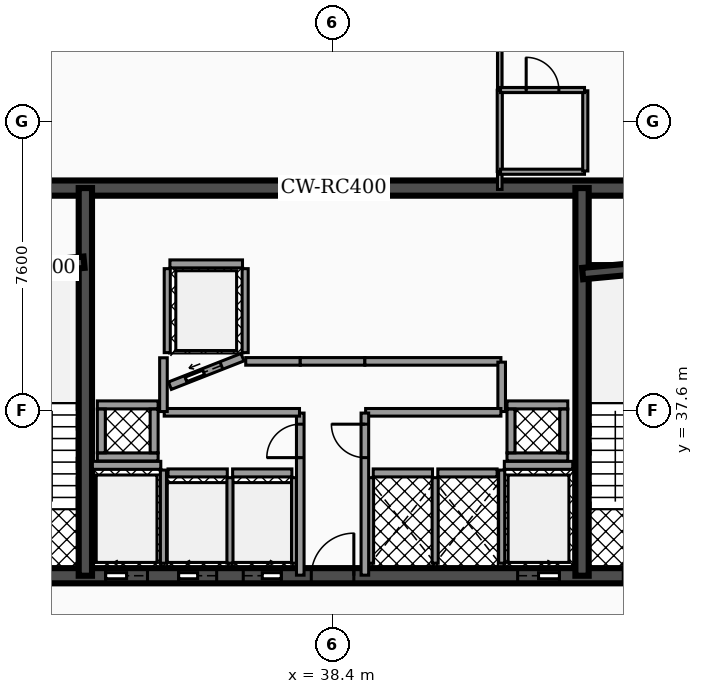
"""IFC4 building model, lengths in metres.
Left out: names, types, materials, properties, quantities, classifications, styles, units other than length and angle.
Written with IfcOpenShell. Run it as: python <this file> out.ifc"""

import sys

from ifc_helpers import new_model, si_unit, direction, frame, frame_2d, origin, place, context, subcontext, project, spatial, rectangle, extrude, element, fill, save


model = new_model("IFC4")
c1 = context("Model", 3, precision=1e-05, world=origin(), true_north=direction((0.0, 1.0)))
c2 = subcontext(c1, "Body", "Model", "MODEL_VIEW")
j1 = project(units=[si_unit("LENGTHUNIT", "METRE"), si_unit("PLANEANGLEUNIT", "RADIAN")], contexts=[c1])
p1 = place(None, origin())
s1 = spatial("IfcSite", under=j1, at=p1, CompositionType="ELEMENT")
p2 = place(p1, origin())
s2 = spatial("IfcBuilding", under=s1, at=p2, CompositionType="ELEMENT")
p3 = place(p2, frame((0.0, 0.0, 157.08)))
s3 = spatial("IfcBuildingStorey", under=s2, at=p3, CompositionType="ELEMENT", Elevation=157.08)
p4 = place(p3, frame((28.4, 43.45, 0.0), z_axis=(0.0, 0.0, 1.0), x_axis=(1.0, 0.0, 0.0)))
e1 = element("IfcWall", 1, at=p4, inside=s3, PredefinedType="SHEAR", context=c2, shape_type="SweptSolid", body=[
    extrude(rectangle(XDim=20.06, YDim=0.4, at=frame_2d((10.03, 0.0))), origin(), (0.0, 0.0, 1.0), 3.5),
])
p5 = place(p3, frame((28.4, 33.25, 0.0), z_axis=(0.0, 0.0, 1.0), x_axis=(1.0, 0.0, 0.0)))
e2 = element("IfcWall", 2, at=p5, inside=s3, PredefinedType="SHEAR", context=c2, shape_type="SweptSolid", body=[
    extrude(rectangle(XDim=20.06, YDim=0.4, at=frame_2d((10.03, 0.0))), origin(), (0.0, 0.0, 1.0), 3.5),
])
p6 = place(p5, frame((4.03, 0.0, 0.0)))
e3 = element("IfcOpeningElement", 3, at=p6, cuts=e2, PredefinedType="OPENING", context=c2, shape_type="SweptSolid", body=[
    extrude(rectangle(XDim=1.1, YDim=2.15, at=frame_2d((0.55, 1.075))), frame((0.0, 0.21, 0.0), z_axis=(0.0, -1.0, 0.0), x_axis=(1.0, 0.0, 0.0)), (0.0, 0.0, 1.0), 0.42),
])
p7 = place(p5, frame((14.87, 0.0, 0.0)))
e4 = element("IfcOpeningElement", 4, at=p7, cuts=e2, PredefinedType="OPENING", context=c2, shape_type="SweptSolid", body=[
    extrude(rectangle(XDim=1.1, YDim=2.15, at=frame_2d((0.55, 1.075))), frame((0.0, 0.21, 0.0), z_axis=(0.0, -1.0, 0.0), x_axis=(1.0, 0.0, 0.0)), (0.0, 0.0, 1.0), 0.42),
])
p8 = place(p5, frame((5.95, 0.0, 0.0)))
e5 = element("IfcOpeningElement", 5, at=p8, cuts=e2, PredefinedType="OPENING", context=c2, shape_type="SweptSolid", body=[
    extrude(rectangle(XDim=1.0, YDim=2.1, at=frame_2d((0.5, 1.05))), frame((0.0, 0.21, 0.0), z_axis=(0.0, -1.0, 0.0), x_axis=(1.0, 0.0, 0.0)), (0.0, 0.0, 1.0), 0.42),
])
p9 = place(p5, frame((7.65, 0.0, 0.0)))
e6 = element("IfcOpeningElement", 6, at=p9, cuts=e2, PredefinedType="OPENING", context=c2, shape_type="SweptSolid", body=[
    extrude(rectangle(XDim=1.0, YDim=2.1, at=frame_2d((0.5, 1.05))), frame((0.0, 0.21, 0.0), z_axis=(0.0, -1.0, 0.0), x_axis=(1.0, 0.0, 0.0)), (0.0, 0.0, 1.0), 0.42),
])
p10 = place(p5, frame((1.31, 0.0, 0.0)))
e7 = element("IfcOpeningElement", 7, at=p10, cuts=e2, PredefinedType="OPENING", context=c2, shape_type="SweptSolid", body=[
    extrude(rectangle(XDim=1.1, YDim=2.2, at=frame_2d((0.55, 1.1))), frame((0.0, 0.21, 0.0), z_axis=(0.0, -1.0, 0.0), x_axis=(1.0, 0.0, 0.0)), (0.0, 0.0, 1.0), 0.42),
])
p11 = place(p5, frame((9.44, 0.0, 0.0)))
e8 = element("IfcOpeningElement", 8, at=p11, cuts=e2, PredefinedType="OPENING", context=c2, shape_type="SweptSolid", body=[
    extrude(rectangle(XDim=1.12, YDim=2.05, at=frame_2d((0.56, 1.025))), frame((0.0, 0.21, 0.0), z_axis=(0.0, -1.0, 0.0), x_axis=(1.0, 0.0, 0.0)), (0.0, 0.0, 1.0), 0.42),
])
p12 = place(p5, frame((17.65, 0.0, 0.0)))
e9 = element("IfcOpeningElement", 9, at=p12, cuts=e2, PredefinedType="OPENING", context=c2, shape_type="SweptSolid", body=[
    extrude(rectangle(XDim=1.1, YDim=2.2, at=frame_2d((0.55, 1.1))), frame((0.0, 0.21, 0.0), z_axis=(0.0, -1.0, 0.0), x_axis=(1.0, 0.0, 0.0)), (0.0, 0.0, 1.0), 0.42),
])
for number, where, z_axis, x_axis in (
    (10, (31.895, 33.25, 0.0), (0.0, 0.0, 1.0), (0.0, 1.0, 0.0)),
    (11, (44.965, 33.25, 0.0), (0.0, 0.0, 1.0), (0.0, 1.0, 0.0)),
):
    element("IfcWall", number, at=place(p3, frame(where, z_axis=z_axis, x_axis=x_axis)), inside=s3, PredefinedType="SHEAR", context=c2, shape_type="SweptSolid", body=[
        extrude(rectangle(XDim=10.2, YDim=0.35, at=frame_2d((5.1, 0.0))), origin(), (0.0, 0.0, 1.0), 3.5),
    ])
p13 = place(p3, frame((28.64, 41.2, 0.0), z_axis=(0.0, 0.0, 1.0), x_axis=(0.995687118776, 0.092774789157, 0.0)))
e12 = element("IfcWall", 12, at=p13, inside=s3, PredefinedType="SHEAR", context=c2, shape_type="SweptSolid", body=[
    extrude(rectangle(XDim=3.234, YDim=0.3, at=frame_2d((1.617, 0.0))), origin(), (0.0, 0.0, 1.0), 3.5),
])
p14 = place(p3, frame((44.98, 41.2, 0.0), z_axis=(0.0, 0.0, 1.0), x_axis=(0.995686468965, 0.09278176286, 0.0)))
e13 = element("IfcWall", 13, at=p14, inside=s3, PredefinedType="SHEAR", context=c2, shape_type="SweptSolid", body=[
    extrude(rectangle(XDim=3.234, YDim=0.3, at=frame_2d((1.617, 0.0))), origin(), (0.0, 0.0, 1.0), 3.5),
])
p15 = place(p3, frame((32.08, 36.155, 0.0), z_axis=(0.0, 0.0, 1.0), x_axis=(1.0, 0.0, 0.0)))
e14 = element("IfcWall", 14, at=p15, inside=s3, PredefinedType="SOLIDWALL", context=c2, shape_type="SweptSolid", body=[
    extrude(rectangle(XDim=1.8, YDim=0.21, at=frame_2d((0.9, 0.0))), origin(), (0.0, 0.0, 1.0), 2.472),
])
p16 = place(p3, frame((33.95, 33.58, 0.0), z_axis=(0.0, 0.0, 1.0), x_axis=(0.0, 1.0, 0.0)))
e15 = element("IfcWall", 15, at=p16, inside=s3, PredefinedType="SOLIDWALL", context=c2, shape_type="SweptSolid", body=[
    extrude(rectangle(XDim=2.45, YDim=0.16, at=frame_2d((1.225, 0.0))), origin(), (0.0, 0.0, 1.0), 2.472),
])
p17 = place(p3, frame((42.92, 36.155, 0.0), z_axis=(0.0, 0.0, 1.0), x_axis=(1.0, 0.0, 0.0)))
e16 = element("IfcWall", 16, at=p17, inside=s3, PredefinedType="SOLIDWALL", context=c2, shape_type="SweptSolid", body=[
    extrude(rectangle(XDim=1.8, YDim=0.21, at=frame_2d((0.9, 0.0))), origin(), (0.0, 0.0, 1.0), 2.472),
])
p18 = place(p3, frame((42.85, 33.58, 0.0), z_axis=(0.0, 0.0, 1.0), x_axis=(0.0, 1.0, 0.0)))
e17 = element("IfcWall", 17, at=p18, inside=s3, PredefinedType="SOLIDWALL", context=c2, shape_type="SweptSolid", body=[
    extrude(rectangle(XDim=2.45, YDim=0.16, at=frame_2d((1.225, 0.0))), origin(), (0.0, 0.0, 1.0), 2.472),
])
p19 = place(p3, frame((34.07, 35.955, 0.0), z_axis=(0.0, 0.0, 1.0), x_axis=(1.0, 0.0, 0.0)))
e18 = element("IfcWall", 18, at=p19, inside=s3, PredefinedType="SOLIDWALL", context=c2, shape_type="SweptSolid", body=[
    extrude(rectangle(XDim=1.56, YDim=0.21, at=frame_2d((0.78, 0.0))), origin(), (0.0, 0.0, 1.0), 2.472),
])
p20 = place(p3, frame((35.7, 33.58, 0.0), z_axis=(0.0, 0.0, 1.0), x_axis=(0.0, 1.0, 0.0)))
e19 = element("IfcWall", 19, at=p20, inside=s3, PredefinedType="SOLIDWALL", context=c2, shape_type="SweptSolid", body=[
    extrude(rectangle(XDim=2.25, YDim=0.16, at=frame_2d((1.125, 0.0))), origin(), (0.0, 0.0, 1.0), 2.472),
])
p21 = place(p3, frame((35.77, 35.955, 0.0), z_axis=(0.0, 0.0, 1.0), x_axis=(1.0, 0.0, 0.0)))
e20 = element("IfcWall", 20, at=p21, inside=s3, PredefinedType="SOLIDWALL", context=c2, shape_type="SweptSolid", body=[
    extrude(rectangle(XDim=1.56, YDim=0.21, at=frame_2d((0.78, 0.0))), origin(), (0.0, 0.0, 1.0), 2.472),
])
p22 = place(p3, frame((37.4, 33.58, 0.0), z_axis=(0.0, 0.0, 1.0), x_axis=(0.0, 1.0, 0.0)))
e21 = element("IfcWall", 21, at=p22, inside=s3, PredefinedType="SOLIDWALL", context=c2, shape_type="SweptSolid", body=[
    extrude(rectangle(XDim=2.25, YDim=0.16, at=frame_2d((1.125, 0.0))), origin(), (0.0, 0.0, 1.0), 2.472),
])
p23 = place(p3, frame((34.12, 38.25, 0.0), z_axis=(0.0, 0.0, 1.0), x_axis=(0.930804993012, 0.36551616241, 0.0)))
e22 = element("IfcWall", 22, at=p23, inside=s3, PredefinedType="SOLIDWALL", context=c2, shape_type="SweptSolid", body=[
    extrude(rectangle(XDim=2.052, YDim=0.21, at=frame_2d((1.026, 0.0))), origin(), (0.0, 0.0, 1.0), 2.472),
])
p24 = place(p23, frame((0.455, 0.0, 0.0)))
e23 = element("IfcOpeningElement", 23, at=p24, cuts=e22, PredefinedType="OPENING", context=c2, shape_type="SweptSolid", body=[
    extrude(rectangle(XDim=1.0, YDim=2.1, at=frame_2d((0.5, 1.05))), frame((0.0, 0.115, 0.0), z_axis=(0.0, -1.0, 0.0), x_axis=(1.0, 0.0, 0.0)), (0.0, 0.0, 1.0), 0.23),
])
p25 = place(p3, frame((34.12, 41.455, 0.0), z_axis=(0.0, 0.0, 1.0), x_axis=(1.0, 0.0, 0.0)))
e24 = element("IfcWall", 24, at=p25, inside=s3, PredefinedType="SOLIDWALL", context=c2, shape_type="SweptSolid", body=[
    extrude(rectangle(XDim=1.91, YDim=0.21, at=frame_2d((0.955, 0.0))), origin(), (0.0, 0.0, 1.0), 2.472),
])
for number, where, z_axis, x_axis in (
    (25, (34.05, 39.12, 0.0), (0.0, 0.0, 1.0), (0.0, 1.0, 0.0)),
    (26, (36.1, 39.12, 0.0), (0.0, 0.0, 1.0), (0.0, 1.0, 0.0)),
):
    element("IfcWall", number, at=place(p3, frame(where, z_axis=z_axis, x_axis=x_axis)), inside=s3, PredefinedType="SOLIDWALL", context=c2, shape_type="SweptSolid", body=[
        extrude(rectangle(XDim=2.21, YDim=0.16, at=frame_2d((1.105, 0.0))), origin(), (0.0, 0.0, 1.0), 2.472),
    ])
p26 = place(p3, frame((39.47, 35.955, 0.0), z_axis=(0.0, 0.0, 1.0), x_axis=(1.0, 0.0, 0.0)))
e27 = element("IfcWall", 27, at=p26, inside=s3, PredefinedType="SOLIDWALL", context=c2, shape_type="SweptSolid", body=[
    extrude(rectangle(XDim=1.56, YDim=0.21, at=frame_2d((0.78, 0.0))), origin(), (0.0, 0.0, 1.0), 2.472),
])
for number, where, z_axis, x_axis in (
    (28, (39.4, 33.58, 0.0), (0.0, 0.0, 1.0), (0.0, 1.0, 0.0)),
    (29, (41.1, 33.58, 0.0), (0.0, 0.0, 1.0), (0.0, 1.0, 0.0)),
):
    element("IfcWall", number, at=place(p3, frame(where, z_axis=z_axis, x_axis=x_axis)), inside=s3, PredefinedType="SOLIDWALL", context=c2, shape_type="SweptSolid", body=[
        extrude(rectangle(XDim=2.25, YDim=0.16, at=frame_2d((1.125, 0.0))), origin(), (0.0, 0.0, 1.0), 2.472),
    ])
p27 = place(p3, frame((41.17, 35.955, 0.0), z_axis=(0.0, 0.0, 1.0), x_axis=(1.0, 0.0, 0.0)))
e30 = element("IfcWall", 30, at=p27, inside=s3, PredefinedType="SOLIDWALL", context=c2, shape_type="SweptSolid", body=[
    extrude(rectangle(XDim=1.56, YDim=0.21, at=frame_2d((0.78, 0.0))), origin(), (0.0, 0.0, 1.0), 2.472),
])
for number, where, z_axis, x_axis in (
    (31, (32.21, 36.375, 0.0), (0.0, 0.0, 1.0), (1.0, 0.0, 0.0)),
    (32, (32.21, 37.745, 0.0), (0.0, 0.0, 1.0), (1.0, 0.0, 0.0)),
):
    element("IfcWall", number, at=place(p3, frame(where, z_axis=z_axis, x_axis=x_axis)), inside=s3, PredefinedType="SOLIDWALL", context=c2, shape_type="SweptSolid", body=[
        extrude(rectangle(XDim=1.6, YDim=0.21, at=frame_2d((0.8, 0.0))), origin(), (0.0, 0.0, 1.0), 3.5),
    ])
for number, where, z_axis, x_axis in (
    (33, (32.315, 36.485, 0.0), (0.0, 0.0, 1.0), (0.0, 1.0, 0.0)),
    (34, (33.705, 36.485, 0.0), (0.0, 0.0, 1.0), (0.0, 1.0, 0.0)),
):
    element("IfcWall", number, at=place(p3, frame(where, z_axis=z_axis, x_axis=x_axis)), inside=s3, PredefinedType="SOLIDWALL", context=c2, shape_type="SweptSolid", body=[
        extrude(rectangle(XDim=1.15, YDim=0.21, at=frame_2d((0.575, 0.0))), origin(), (0.0, 0.0, 1.0), 3.5),
    ])
for number, where, z_axis, x_axis in (
    (35, (42.99, 36.375, 0.0), (0.0, 0.0, 1.0), (1.0, 0.0, 0.0)),
    (36, (42.99, 37.745, 0.0), (0.0, 0.0, 1.0), (1.0, 0.0, 0.0)),
):
    element("IfcWall", number, at=place(p3, frame(where, z_axis=z_axis, x_axis=x_axis)), inside=s3, PredefinedType="SOLIDWALL", context=c2, shape_type="SweptSolid", body=[
        extrude(rectangle(XDim=1.6, YDim=0.21, at=frame_2d((0.8, 0.0))), origin(), (0.0, 0.0, 1.0), 3.5),
    ])
for number, where, z_axis, x_axis in (
    (37, (43.095, 36.485, 0.0), (0.0, 0.0, 1.0), (0.0, 1.0, 0.0)),
    (38, (44.485, 36.485, 0.0), (0.0, 0.0, 1.0), (0.0, 1.0, 0.0)),
):
    element("IfcWall", number, at=place(p3, frame(where, z_axis=z_axis, x_axis=x_axis)), inside=s3, PredefinedType="SOLIDWALL", context=c2, shape_type="SweptSolid", body=[
        extrude(rectangle(XDim=1.15, YDim=0.21, at=frame_2d((0.575, 0.0))), origin(), (0.0, 0.0, 1.0), 3.5),
    ])
p28 = place(p3, frame((37.55, 33.265, 0.0), z_axis=(0.0, 0.0, 1.0), x_axis=(0.0, 1.0, 0.0)))
e39 = element("IfcWall", 39, at=p28, inside=s3, PredefinedType="PARTITIONING", context=c2, shape_type="SweptSolid", body=[
    extrude(rectangle(XDim=4.265, YDim=0.2, at=frame_2d((2.133, 0.0))), origin(), (0.0, 0.0, 1.0), 2.457),
])
p29 = place(p28, frame((3.093, 0.0, 0.0)))
e40 = element("IfcOpeningElement", 40, at=p29, cuts=e39, PredefinedType="OPENING", context=c2, shape_type="SweptSolid", body=[
    extrude(rectangle(XDim=0.88, YDim=2.05, at=frame_2d((0.44, 1.025))), frame((0.0, 0.11, 0.0), z_axis=(0.0, -1.0, 0.0), x_axis=(1.0, 0.0, 0.0)), (0.0, 0.0, 1.0), 0.22),
])
p30 = place(p3, frame((33.97, 37.55, 0.0), z_axis=(0.0, 0.0, 1.0), x_axis=(1.0, 0.0, 0.0)))
e41 = element("IfcWall", 41, at=p30, inside=s3, PredefinedType="PARTITIONING", context=c2, shape_type="SweptSolid", body=[
    extrude(rectangle(XDim=3.56, YDim=0.2, at=frame_2d((1.78, 0.0))), origin(), (0.0, 0.0, 1.0), 2.457),
])
p31 = place(p3, frame((33.95, 37.57, 0.0), z_axis=(0.0, 0.0, 1.0), x_axis=(0.0, 1.0, 0.0)))
e42 = element("IfcWall", 42, at=p31, inside=s3, PredefinedType="PARTITIONING", context=c2, shape_type="SweptSolid", body=[
    extrude(rectangle(XDim=1.415, YDim=0.2, at=frame_2d((0.708, 0.0))), origin(), (0.0, 0.0, 1.0), 2.457),
])
p32 = place(p3, frame((36.115, 38.89, 0.0), z_axis=(0.0, 0.0, 1.0), x_axis=(1.0, 0.0, 0.0)))
e43 = element("IfcWall", 43, at=p32, inside=s3, PredefinedType="PARTITIONING", context=c2, shape_type="SweptSolid", body=[
    extrude(rectangle(XDim=1.435, YDim=0.2, at=frame_2d((0.718, 0.0))), origin(), (0.0, 0.0, 1.0), 2.457),
])
p33 = place(p3, frame((37.55, 38.89, 0.0), z_axis=(0.0, 0.0, 1.0), x_axis=(1.0, 0.0, 0.0)))
e44 = element("IfcWall", 44, at=p33, inside=s3, PredefinedType="PARTITIONING", context=c2, shape_type="SweptSolid", body=[
    extrude(rectangle(XDim=1.7, YDim=0.2, at=frame_2d((0.85, 0.0))), origin(), (0.0, 0.0, 1.0), 2.457),
])
p34 = place(p3, frame((39.25, 38.89, 0.0), z_axis=(0.0, 0.0, 1.0), x_axis=(1.0, 0.0, 0.0)))
e45 = element("IfcWall", 45, at=p34, inside=s3, PredefinedType="PARTITIONING", context=c2, shape_type="SweptSolid", body=[
    extrude(rectangle(XDim=3.58, YDim=0.2, at=frame_2d((1.79, 0.0))), origin(), (0.0, 0.0, 1.0), 2.457),
])
p35 = place(p3, frame((42.85, 37.57, 0.0), z_axis=(0.0, 0.0, 1.0), x_axis=(0.0, 1.0, 0.0)))
e46 = element("IfcWall", 46, at=p35, inside=s3, PredefinedType="PARTITIONING", context=c2, shape_type="SweptSolid", body=[
    extrude(rectangle(XDim=1.3, YDim=0.2, at=frame_2d((0.65, 0.0))), origin(), (0.0, 0.0, 1.0), 2.457),
])
p36 = place(p3, frame((39.27, 37.55, 0.0), z_axis=(0.0, 0.0, 1.0), x_axis=(1.0, 0.0, 0.0)))
e47 = element("IfcWall", 47, at=p36, inside=s3, PredefinedType="PARTITIONING", context=c2, shape_type="SweptSolid", body=[
    extrude(rectangle(XDim=3.56, YDim=0.2, at=frame_2d((1.78, 0.0))), origin(), (0.0, 0.0, 1.0), 2.457),
])
p37 = place(p3, frame((39.25, 33.265, 0.0), z_axis=(0.0, 0.0, 1.0), x_axis=(0.0, 1.0, 0.0)))
e48 = element("IfcWall", 48, at=p37, inside=s3, PredefinedType="PARTITIONING", context=c2, shape_type="SweptSolid", body=[
    extrude(rectangle(XDim=4.265, YDim=0.2, at=frame_2d((2.133, 0.0))), origin(), (0.0, 0.0, 1.0), 2.457),
])
p38 = place(p37, frame((3.093, 0.0, 0.0)))
e49 = element("IfcOpeningElement", 49, at=p38, cuts=e48, PredefinedType="OPENING", context=c2, shape_type="SweptSolid", body=[
    extrude(rectangle(XDim=0.88, YDim=2.05, at=frame_2d((0.44, 1.025))), frame((0.0, 0.11, 0.0), z_axis=(0.0, -1.0, 0.0), x_axis=(1.0, 0.0, 0.0)), (0.0, 0.0, 1.0), 0.22),
])
p39 = place(p3, frame((42.8, 46.035, 0.0), z_axis=(0.0, 0.0, 1.0), x_axis=(0.0, 1.0, 0.0)))
e50 = element("IfcWall", 50, at=p39, inside=s3, PredefinedType="PARTITIONING", context=c2, shape_type="SweptSolid", body=[
    extrude(rectangle(XDim=2.867, YDim=0.12, at=frame_2d((1.433, 0.0))), origin(), (0.0, 0.0, 1.0), 2.457),
])
p40 = place(p3, frame((42.8, 43.415, 0.0), z_axis=(0.0, 0.0, 1.0), x_axis=(0.0, 1.0, 0.0)))
e51 = element("IfcWall", 51, at=p40, inside=s3, PredefinedType="PARTITIONING", context=c2, shape_type="SweptSolid", body=[
    extrude(rectangle(XDim=0.46, YDim=0.12, at=frame_2d((0.23, 0.0))), origin(), (0.0, 0.0, 1.0), 2.457),
])
p41 = place(p3, frame((42.8, 43.885, 0.0), z_axis=(0.0, 0.0, 1.0), x_axis=(0.0, 1.0, 0.0)))
e52 = element("IfcWall", 52, at=p41, inside=s3, PredefinedType="PARTITIONING", context=c2, shape_type="SweptSolid", body=[
    extrude(rectangle(XDim=2.14, YDim=0.135, at=frame_2d((1.07, 0.0))), origin(), (0.0, 0.0, 1.0), 2.457),
])
p42 = place(p3, frame((42.82, 43.88, 0.0), z_axis=(0.0, 0.0, 1.0), x_axis=(1.0, 0.0, 0.0)))
e53 = element("IfcWall", 53, at=p42, inside=s3, PredefinedType="PARTITIONING", context=c2, shape_type="SweptSolid", body=[
    extrude(rectangle(XDim=2.21, YDim=0.135, at=frame_2d((1.105, 0.0))), origin(), (0.0, 0.0, 1.0), 2.457),
])
p43 = place(p3, frame((45.05, 43.9, 0.0), z_axis=(0.0, 0.0, 1.0), x_axis=(0.0, 1.0, 0.0)))
e54 = element("IfcWall", 54, at=p43, inside=s3, PredefinedType="PARTITIONING", context=c2, shape_type="SweptSolid", body=[
    extrude(rectangle(XDim=2.11, YDim=0.135, at=frame_2d((1.055, 0.0))), origin(), (0.0, 0.0, 1.0), 2.457),
])
p44 = place(p3, frame((42.82, 46.03, 0.0), z_axis=(0.0, 0.0, 1.0), x_axis=(1.0, 0.0, 0.0)))
e55 = element("IfcWall", 55, at=p44, inside=s3, PredefinedType="PARTITIONING", context=c2, shape_type="SweptSolid", body=[
    extrude(rectangle(XDim=2.21, YDim=0.135, at=frame_2d((1.105, 0.0))), origin(), (0.0, 0.0, 1.0), 2.457),
])
p45 = place(p44, frame((0.675, 0.0, 0.0)))
e56 = element("IfcOpeningElement", 56, at=p45, cuts=e55, PredefinedType="OPENING", context=c2, shape_type="SweptSolid", body=[
    extrude(rectangle(XDim=0.86, YDim=2.05, at=frame_2d((0.43, 1.025))), frame((0.0, 0.077, 0.0), z_axis=(0.0, -1.0, 0.0), x_axis=(1.0, 0.0, 0.0)), (0.0, 0.0, 1.0), 0.155),
])
p46 = place(p6, origin())
e57 = element("IfcDoor", 57, at=p46, inside=s3, OperationType="SLIDING_TO_LEFT", PredefinedType="DOOR", context=c2, shape_type="SweptSolid", body=[
    extrude(rectangle(XDim=1.1, YDim=2.15, at=frame_2d((0.55, 1.075))), frame((0.0, 0.025, 0.0), z_axis=(0.0, -1.0, 0.0), x_axis=(1.0, 0.0, 0.0)), (0.0, 0.0, 1.0), 0.05),
])
fill(e3, e57)
p47 = place(p7, origin())
e58 = element("IfcDoor", 58, at=p47, inside=s3, OperationType="SLIDING_TO_RIGHT", PredefinedType="DOOR", context=c2, shape_type="SweptSolid", body=[
    extrude(rectangle(XDim=1.1, YDim=2.15, at=frame_2d((0.55, 1.075))), frame((0.0, 0.025, 0.0), z_axis=(0.0, -1.0, 0.0), x_axis=(1.0, 0.0, 0.0)), (0.0, 0.0, 1.0), 0.05),
])
fill(e4, e58)
p48 = place(p8, origin())
e59 = element("IfcDoor", 59, at=p48, inside=s3, OperationType="SLIDING_TO_LEFT", PredefinedType="DOOR", context=c2, shape_type="SweptSolid", body=[
    extrude(rectangle(XDim=1.0, YDim=2.1, at=frame_2d((0.5, 1.05))), frame((0.0, 0.025, 0.0), z_axis=(0.0, -1.0, 0.0), x_axis=(1.0, 0.0, 0.0)), (0.0, 0.0, 1.0), 0.05),
])
fill(e5, e59)
p49 = place(p9, origin())
e60 = element("IfcDoor", 60, at=p49, inside=s3, OperationType="SLIDING_TO_RIGHT", PredefinedType="DOOR", context=c2, shape_type="SweptSolid", body=[
    extrude(rectangle(XDim=1.0, YDim=2.1, at=frame_2d((0.5, 1.05))), frame((0.0, 0.025, 0.0), z_axis=(0.0, -1.0, 0.0), x_axis=(1.0, 0.0, 0.0)), (0.0, 0.0, 1.0), 0.05),
])
fill(e6, e60)
p50 = place(p24, origin())
e61 = element("IfcDoor", 61, at=p50, inside=s3, OperationType="SLIDING_TO_LEFT", PredefinedType="DOOR", context=c2, shape_type="SweptSolid", body=[
    extrude(rectangle(XDim=1.0, YDim=2.1, at=frame_2d((0.5, 1.05))), frame((0.0, 0.025, 0.0), z_axis=(0.0, -1.0, 0.0), x_axis=(1.0, 0.0, 0.0)), (0.0, 0.0, 1.0), 0.05),
])
fill(e23, e61)
p51 = place(p11, origin())
e62 = element("IfcDoor", 62, at=p51, inside=s3, OperationType="SINGLE_SWING_RIGHT", PredefinedType="DOOR", context=c2, shape_type="SweptSolid", body=[
    extrude(rectangle(XDim=1.12, YDim=2.05, at=frame_2d((0.56, 1.025))), frame((0.0, 0.025, 0.0), z_axis=(0.0, -1.0, 0.0), x_axis=(1.0, 0.0, 0.0)), (0.0, 0.0, 1.0), 0.05),
])
fill(e8, e62)
p52 = place(p12, origin())
e63 = element("IfcDoor", 63, at=p52, inside=s3, OperationType="SINGLE_SWING_RIGHT", PredefinedType="DOOR", context=c2, shape_type="SweptSolid", body=[
    extrude(rectangle(XDim=1.1, YDim=2.2, at=frame_2d((0.55, 1.1))), frame((0.0, 0.025, 0.0), z_axis=(0.0, -1.0, 0.0), x_axis=(1.0, 0.0, 0.0)), (0.0, 0.0, 1.0), 0.05),
])
fill(e9, e63)
p53 = place(p29, origin())
e64 = element("IfcDoor", 64, at=p53, inside=s3, OperationType="SINGLE_SWING_LEFT", PredefinedType="DOOR", context=c2, shape_type="SweptSolid", body=[
    extrude(rectangle(XDim=0.88, YDim=2.05, at=frame_2d((0.44, 1.025))), frame((0.0, 0.025, 0.0), z_axis=(0.0, -1.0, 0.0), x_axis=(1.0, 0.0, 0.0)), (0.0, 0.0, 1.0), 0.05),
])
fill(e40, e64)
p54 = place(p38, origin())
e65 = element("IfcDoor", 65, at=p54, inside=s3, OperationType="SINGLE_SWING_RIGHT", PredefinedType="DOOR", context=c2, shape_type="SweptSolid", body=[
    extrude(rectangle(XDim=0.88, YDim=2.05, at=frame_2d((0.44, 1.025))), frame((0.0, 0.025, 0.0), z_axis=(0.0, -1.0, 0.0), x_axis=(1.0, 0.0, 0.0)), (0.0, 0.0, 1.0), 0.05),
])
fill(e49, e65)
p55 = place(p45, origin())
e66 = element("IfcDoor", 66, at=p55, inside=s3, OperationType="SINGLE_SWING_LEFT", PredefinedType="DOOR", context=c2, shape_type="SweptSolid", body=[
    extrude(rectangle(XDim=0.86, YDim=2.05, at=frame_2d((0.43, 1.025))), frame((0.0, 0.025, 0.0), z_axis=(0.0, -1.0, 0.0), x_axis=(1.0, 0.0, 0.0)), (0.0, 0.0, 1.0), 0.05),
])
fill(e56, e66)
save(model, sys.argv[1])
